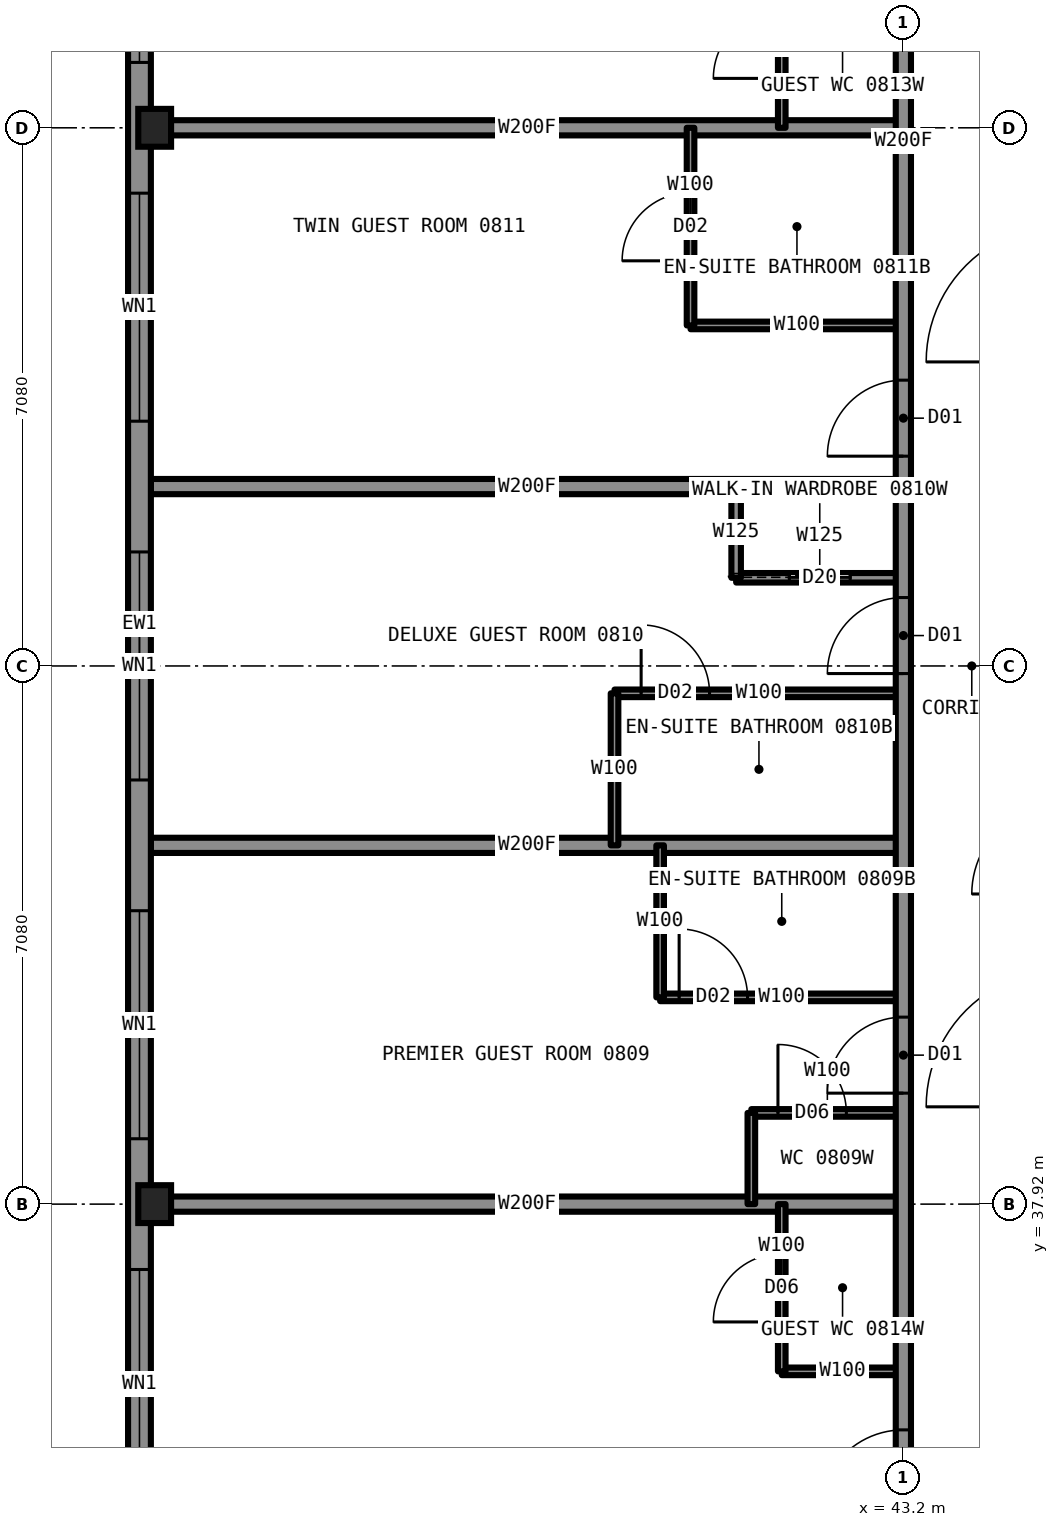
"""IFC4 building model, lengths in metres.
Left out: names, types, materials, properties, quantities, classifications, styles, units other than length and angle.
Written with IfcOpenShell. Run it as: python <this file> out.ifc"""

import sys

from ifc_helpers import new_model, si_unit, direction, frame, frame_2d, origin, origin_2d, place, context, subcontext, project, spatial, rectangle, i_section, extrude, element, fill, save


model = new_model("IFC4")
c1 = context("Model", 3, precision=1e-05, world=origin(), true_north=direction((0.0, 1.0)))
c2 = subcontext(c1, "Body", "Model", "MODEL_VIEW")
j1 = project(units=[si_unit("LENGTHUNIT", "METRE"), si_unit("PLANEANGLEUNIT", "RADIAN")], contexts=[c1])
p1 = place(None, origin())
s1 = spatial("IfcSite", under=j1, at=p1, CompositionType="ELEMENT")
p2 = place(p1, origin())
s2 = spatial("IfcBuilding", under=s1, at=p2, CompositionType="ELEMENT")
p3 = place(p2, frame((0.0, 0.0, 28.5)))
s3 = spatial("IfcBuildingStorey", under=s2, at=p3, CompositionType="ELEMENT", Elevation=28.5)
for number, where, z_axis, x_axis in (
    (1, (33.35, 37.92, 0.0), (0.0, 0.0, 1.0), (1.0, 0.0, 0.0)),
    (2, (33.35, 52.08, 0.0), (0.0, 0.0, 1.0), (1.0, 0.0, 0.0)),
):
    element("IfcColumn", number, at=place(p3, frame(where, z_axis=z_axis, x_axis=x_axis)), inside=s3, PredefinedType="COLUMN", context=c2, shape_type="SweptSolid", body=[
        extrude(i_section(OverallWidth=0.432, OverallDepth=0.498, WebThickness=0.056, FlangeThickness=0.089, at=origin_2d()), origin(), (0.0, 0.0, 1.0), 3.5),
    ])
p4 = place(p3, frame((39.4, 44.64, 0.0), z_axis=(0.0, 0.0, 1.0), x_axis=(1.0, 0.0, 0.0)))
e3 = element("IfcWall", 3, at=p4, inside=s3, PredefinedType="PARTITIONING", context=c2, shape_type="SweptSolid", body=[
    extrude(rectangle(XDim=3.8, YDim=0.1, at=frame_2d((1.9, 0.0))), origin(), (0.0, 0.0, 1.0), 3.33),
])
p5 = place(p4, frame((0.35, 0.0, 0.0)))
e4 = element("IfcOpeningElement", 4, at=p5, cuts=e3, PredefinedType="OPENING", context=c2, shape_type="SweptSolid", body=[
    extrude(rectangle(XDim=0.9, YDim=2.1, at=frame_2d((0.45, 1.05))), frame((0.0, 0.06, 0.0), z_axis=(0.0, -1.0, 0.0), x_axis=(1.0, 0.0, 0.0)), (0.0, 0.0, 1.0), 0.12),
])
p6 = place(p3, frame((33.3, 42.64, 0.0), z_axis=(0.0, 0.0, 1.0), x_axis=(1.0, 0.0, 0.0)))
e5 = element("IfcWall", 5, at=p6, inside=s3, PredefinedType="PARTITIONING", context=c2, shape_type="SweptSolid", body=[
    extrude(rectangle(XDim=9.9, YDim=0.2, at=frame_2d((4.95, 0.0))), origin(), (0.0, 0.0, 1.0), 2.723),
])
p7 = place(p3, frame((40.0, 40.64, 0.0), z_axis=(0.0, 0.0, 1.0), x_axis=(1.0, 0.0, 0.0)))
e6 = element("IfcWall", 6, at=p7, inside=s3, PredefinedType="PARTITIONING", context=c2, shape_type="SweptSolid", body=[
    extrude(rectangle(XDim=3.2, YDim=0.1, at=frame_2d((1.6, 0.0))), origin(), (0.0, 0.0, 1.0), 3.33),
])
p8 = place(p7, frame((0.25, 0.0, 0.0)))
e7 = element("IfcOpeningElement", 7, at=p8, cuts=e6, PredefinedType="OPENING", context=c2, shape_type="SweptSolid", body=[
    extrude(rectangle(XDim=0.9, YDim=2.1, at=frame_2d((0.45, 1.05))), frame((0.0, 0.06, 0.0), z_axis=(0.0, -1.0, 0.0), x_axis=(1.0, 0.0, 0.0)), (0.0, 0.0, 1.0), 0.12),
])
p9 = place(p3, frame((41.2, 39.12, 0.0), z_axis=(0.0, 0.0, 1.0), x_axis=(1.0, 0.0, 0.0)))
e8 = element("IfcWall", 8, at=p9, inside=s3, PredefinedType="PARTITIONING", context=c2, shape_type="SweptSolid", body=[
    extrude(rectangle(XDim=2.0, YDim=0.1, at=frame_2d((1.0, 0.0))), origin(), (0.0, 0.0, 1.0), 3.33),
])
p10 = place(p9, frame((0.35, 0.0, 0.0)))
e9 = element("IfcOpeningElement", 9, at=p10, cuts=e8, PredefinedType="OPENING", context=c2, shape_type="SweptSolid", body=[
    extrude(rectangle(XDim=0.9, YDim=2.1, at=frame_2d((0.45, 1.05))), frame((0.0, 0.06, 0.0), z_axis=(0.0, -1.0, 0.0), x_axis=(1.0, 0.0, 0.0)), (0.0, 0.0, 1.0), 0.12),
])
p11 = place(p3, frame((33.3, 37.92, 0.0), z_axis=(0.0, 0.0, 1.0), x_axis=(1.0, 0.0, 0.0)))
e10 = element("IfcWall", 10, at=p11, inside=s3, PredefinedType="PARTITIONING", context=c2, shape_type="SweptSolid", body=[
    extrude(rectangle(XDim=9.9, YDim=0.2, at=frame_2d((4.95, 0.0))), origin(), (0.0, 0.0, 1.0), 2.573),
])
p12 = place(p3, frame((41.6, 35.72, 0.0), z_axis=(0.0, 0.0, 1.0), x_axis=(1.0, 0.0, 0.0)))
e11 = element("IfcWall", 11, at=p12, inside=s3, PredefinedType="PARTITIONING", context=c2, shape_type="SweptSolid", body=[
    extrude(rectangle(XDim=1.6, YDim=0.1, at=frame_2d((0.8, 0.0))), origin(), (0.0, 0.0, 1.0), 2.723),
])
p13 = place(p3, frame((41.0, 46.16, 0.0), z_axis=(0.0, 0.0, 1.0), x_axis=(1.0, 0.0, 0.0)))
e12 = element("IfcWall", 12, at=p13, inside=s3, PredefinedType="PARTITIONING", context=c2, shape_type="SweptSolid", body=[
    extrude(rectangle(XDim=2.2, YDim=0.125, at=frame_2d((1.1, 0.0))), origin(), (0.0, 0.0, 1.0), 3.33),
])
p14 = place(p13, frame((0.7, 0.0, 0.0)))
e13 = element("IfcOpeningElement", 13, at=p14, cuts=e12, PredefinedType="OPENING", context=c2, shape_type="SweptSolid", body=[
    extrude(rectangle(XDim=0.8, YDim=2.1, at=frame_2d((0.4, 1.05))), frame((0.0, 0.073, 0.0), z_axis=(0.0, -1.0, 0.0), x_axis=(1.0, 0.0, 0.0)), (0.0, 0.0, 1.0), 0.145),
])
p15 = place(p3, frame((33.3, 47.36, 0.0), z_axis=(0.0, 0.0, 1.0), x_axis=(1.0, 0.0, 0.0)))
e14 = element("IfcWall", 14, at=p15, inside=s3, PredefinedType="PARTITIONING", context=c2, shape_type="SweptSolid", body=[
    extrude(rectangle(XDim=9.9, YDim=0.2, at=frame_2d((4.95, 0.0))), origin(), (0.0, 0.0, 1.0), 2.723),
])
p16 = place(p3, frame((40.4, 49.48, 0.0), z_axis=(0.0, 0.0, 1.0), x_axis=(1.0, 0.0, 0.0)))
e15 = element("IfcWall", 15, at=p16, inside=s3, PredefinedType="PARTITIONING", context=c2, shape_type="SweptSolid", body=[
    extrude(rectangle(XDim=2.8, YDim=0.1, at=frame_2d((1.4, 0.0))), origin(), (0.0, 0.0, 1.0), 3.33),
])
p17 = place(p3, frame((33.3, 52.08, 0.0), z_axis=(0.0, 0.0, 1.0), x_axis=(1.0, 0.0, 0.0)))
e16 = element("IfcWall", 16, at=p17, inside=s3, PredefinedType="PARTITIONING", context=c2, shape_type="SweptSolid", body=[
    extrude(rectangle(XDim=9.9, YDim=0.2, at=frame_2d((4.95, 0.0))), origin(), (0.0, 0.0, 1.0), 2.573),
])
p18 = place(p3, frame((43.2, 33.22, 0.0), z_axis=(0.0, 0.0, 1.0), x_axis=(0.0, 1.0, 0.0)))
e17 = element("IfcWall", 17, at=p18, inside=s3, PredefinedType="PARTITIONING", context=c2, shape_type="SweptSolid", body=[
    extrude(rectangle(XDim=23.56, YDim=0.2, at=frame_2d((11.78, 0.0))), origin(), (0.0, 0.0, 1.0), 3.33),
])
p19 = place(p18, frame((6.16, 0.0, 0.0)))
e18 = element("IfcOpeningElement", 18, at=p19, cuts=e17, PredefinedType="OPENING", context=c2, shape_type="SweptSolid", body=[
    extrude(rectangle(XDim=1.0, YDim=2.2, at=frame_2d((0.5, 1.1))), frame((0.0, 0.11, 0.0), z_axis=(0.0, -1.0, 0.0), x_axis=(1.0, 0.0, 0.0)), (0.0, 0.0, 1.0), 0.22),
])
p20 = place(p18, frame((11.68, 0.0, 0.0)))
e19 = element("IfcOpeningElement", 19, at=p20, cuts=e17, PredefinedType="OPENING", context=c2, shape_type="SweptSolid", body=[
    extrude(rectangle(XDim=1.0, YDim=2.2, at=frame_2d((0.5, 1.1))), frame((0.0, 0.11, 0.0), z_axis=(0.0, -1.0, 0.0), x_axis=(1.0, 0.0, 0.0)), (0.0, 0.0, 1.0), 0.22),
])
p21 = place(p18, frame((14.54, 0.0, 0.0)))
e20 = element("IfcOpeningElement", 20, at=p21, cuts=e17, PredefinedType="OPENING", context=c2, shape_type="SweptSolid", body=[
    extrude(rectangle(XDim=1.0, YDim=2.2, at=frame_2d((0.5, 1.1))), frame((0.0, 0.11, 0.0), z_axis=(0.0, -1.0, 0.0), x_axis=(1.0, 0.0, 0.0)), (0.0, 0.0, 1.0), 0.22),
])
p22 = place(p18, frame((21.83, 0.0, 0.0)))
e21 = element("IfcOpeningElement", 21, at=p22, cuts=e17, PredefinedType="OPENING", context=c2, shape_type="SweptSolid", body=[
    extrude(rectangle(XDim=1.1, YDim=2.2, at=frame_2d((0.55, 1.1))), frame((0.0, 0.11, 0.0), z_axis=(0.0, -1.0, 0.0), x_axis=(1.0, 0.0, 0.0)), (0.0, 0.0, 1.0), 0.22),
])
p23 = place(p18, frame((0.63, 0.0, 0.0)))
e22 = element("IfcOpeningElement", 22, at=p23, cuts=e17, PredefinedType="OPENING", context=c2, shape_type="SweptSolid", body=[
    extrude(rectangle(XDim=1.1, YDim=2.2, at=frame_2d((0.55, 1.1))), frame((0.0, 0.11, 0.0), z_axis=(0.0, -1.0, 0.0), x_axis=(1.0, 0.0, 0.0)), (0.0, 0.0, 1.0), 0.22),
])
p24 = place(p3, frame((41.6, 35.72, 0.0), z_axis=(0.0, 0.0, 1.0), x_axis=(0.0, 1.0, 0.0)))
e23 = element("IfcWall", 23, at=p24, inside=s3, PredefinedType="PARTITIONING", context=c2, shape_type="SweptSolid", body=[
    extrude(rectangle(XDim=2.2, YDim=0.1, at=frame_2d((1.1, 0.0))), origin(), (0.0, 0.0, 1.0), 3.33),
])
p25 = place(p24, frame((0.65, 0.0, 0.0)))
e24 = element("IfcOpeningElement", 24, at=p25, cuts=e23, PredefinedType="OPENING", context=c2, shape_type="SweptSolid", body=[
    extrude(rectangle(XDim=0.9, YDim=2.1, at=frame_2d((0.45, 1.05))), frame((0.0, 0.06, 0.0), z_axis=(0.0, -1.0, 0.0), x_axis=(1.0, 0.0, 0.0)), (0.0, 0.0, 1.0), 0.12),
])
p26 = place(p3, frame((41.6, 52.08, 0.0), z_axis=(0.0, 0.0, 1.0), x_axis=(0.0, 1.0, 0.0)))
e25 = element("IfcWall", 25, at=p26, inside=s3, PredefinedType="PARTITIONING", context=c2, shape_type="SweptSolid", body=[
    extrude(rectangle(XDim=2.2, YDim=0.1, at=frame_2d((1.1, 0.0))), origin(), (0.0, 0.0, 1.0), 3.33),
])
p27 = place(p26, frame((0.65, 0.0, 0.0)))
e26 = element("IfcOpeningElement", 26, at=p27, cuts=e25, PredefinedType="OPENING", context=c2, shape_type="SweptSolid", body=[
    extrude(rectangle(XDim=0.9, YDim=2.1, at=frame_2d((0.45, 1.05))), frame((0.0, 0.06, 0.0), z_axis=(0.0, -1.0, 0.0), x_axis=(1.0, 0.0, 0.0)), (0.0, 0.0, 1.0), 0.12),
])
p28 = place(p3, frame((41.2, 37.92, 0.0), z_axis=(0.0, 0.0, 1.0), x_axis=(0.0, 1.0, 0.0)))
e27 = element("IfcWall", 27, at=p28, inside=s3, PredefinedType="PARTITIONING", context=c2, shape_type="SweptSolid", body=[
    extrude(rectangle(XDim=1.2, YDim=0.1, at=frame_2d((0.6, 0.0))), origin(), (0.0, 0.0, 1.0), 3.33),
])
p29 = place(p3, frame((41.0, 46.16, 0.0), z_axis=(0.0, 0.0, 1.0), x_axis=(0.0, 1.0, 0.0)))
e28 = element("IfcWall", 28, at=p29, inside=s3, PredefinedType="PARTITIONING", context=c2, shape_type="SweptSolid", body=[
    extrude(rectangle(XDim=1.2, YDim=0.125, at=frame_2d((0.6, 0.0))), origin(), (0.0, 0.0, 1.0), 3.33),
])
p30 = place(p3, frame((40.4, 49.48, 0.0), z_axis=(0.0, 0.0, 1.0), x_axis=(0.0, 1.0, 0.0)))
e29 = element("IfcWall", 29, at=p30, inside=s3, PredefinedType="PARTITIONING", context=c2, shape_type="SweptSolid", body=[
    extrude(rectangle(XDim=2.6, YDim=0.1, at=frame_2d((1.3, 0.0))), origin(), (0.0, 0.0, 1.0), 3.33),
])
p31 = place(p30, frame((0.85, 0.0, 0.0)))
e30 = element("IfcOpeningElement", 30, at=p31, cuts=e29, PredefinedType="OPENING", context=c2, shape_type="SweptSolid", body=[
    extrude(rectangle(XDim=0.9, YDim=2.1, at=frame_2d((0.45, 1.05))), frame((0.0, 0.06, 0.0), z_axis=(0.0, -1.0, 0.0), x_axis=(1.0, 0.0, 0.0)), (0.0, 0.0, 1.0), 0.12),
])
for number, where, z_axis, x_axis in (
    (31, (40.0, 40.64, 0.0), (0.0, 0.0, 1.0), (0.0, 1.0, 0.0)),
    (32, (39.4, 42.64, 0.0), (0.0, 0.0, 1.0), (0.0, 1.0, 0.0)),
):
    element("IfcWall", number, at=place(p3, frame(where, z_axis=z_axis, x_axis=x_axis)), inside=s3, PredefinedType="PARTITIONING", context=c2, shape_type="SweptSolid", body=[
        extrude(rectangle(XDim=2.0, YDim=0.1, at=frame_2d((1.0, 0.0))), origin(), (0.0, 0.0, 1.0), 3.33),
    ])
p32 = place(p3, frame((33.15, 61.5, 0.0), z_axis=(0.0, 0.0, 1.0), x_axis=(0.0, -1.0, 0.0)))
e33 = element("IfcWall", 33, at=p32, inside=s3, PredefinedType="SOLIDWALL", context=c2, shape_type="SweptSolid", body=[
    extrude(rectangle(XDim=33.0, YDim=0.3, at=frame_2d((16.5, 0.0))), origin(), (0.0, 0.0, 1.0), 2.83),
])
p33 = place(p32, frame((0.85, 0.0, 0.5)))
e34 = element("IfcOpeningElement", 34, at=p33, cuts=e33, PredefinedType="OPENING", context=c2, shape_type="SweptSolid", body=[
    extrude(rectangle(XDim=3.0, YDim=2.0, at=frame_2d((1.5, 1.0))), frame((0.0, 0.16, 0.0), z_axis=(0.0, -1.0, 0.0), x_axis=(1.0, 0.0, 0.0)), (0.0, 0.0, 1.0), 0.32),
])
p34 = place(p32, frame((5.56, 0.0, 0.5)))
e35 = element("IfcOpeningElement", 35, at=p34, cuts=e33, PredefinedType="OPENING", context=c2, shape_type="SweptSolid", body=[
    extrude(rectangle(XDim=3.0, YDim=2.0, at=frame_2d((1.5, 1.0))), frame((0.0, 0.16, 0.0), z_axis=(0.0, -1.0, 0.0), x_axis=(1.0, 0.0, 0.0)), (0.0, 0.0, 1.0), 0.32),
])
p35 = place(p32, frame((10.28, 0.0, 0.5)))
e36 = element("IfcOpeningElement", 36, at=p35, cuts=e33, PredefinedType="OPENING", context=c2, shape_type="SweptSolid", body=[
    extrude(rectangle(XDim=3.0, YDim=2.0, at=frame_2d((1.5, 1.0))), frame((0.0, 0.16, 0.0), z_axis=(0.0, -1.0, 0.0), x_axis=(1.0, 0.0, 0.0)), (0.0, 0.0, 1.0), 0.32),
])
p36 = place(p32, frame((15.0, 0.0, 0.5)))
e37 = element("IfcOpeningElement", 37, at=p36, cuts=e33, PredefinedType="OPENING", context=c2, shape_type="SweptSolid", body=[
    extrude(rectangle(XDim=3.0, YDim=2.0, at=frame_2d((1.5, 1.0))), frame((0.0, 0.16, 0.0), z_axis=(0.0, -1.0, 0.0), x_axis=(1.0, 0.0, 0.0)), (0.0, 0.0, 1.0), 0.32),
])
p37 = place(p32, frame((19.72, 0.0, 0.5)))
e38 = element("IfcOpeningElement", 38, at=p37, cuts=e33, PredefinedType="OPENING", context=c2, shape_type="SweptSolid", body=[
    extrude(rectangle(XDim=3.0, YDim=2.0, at=frame_2d((1.5, 1.0))), frame((0.0, 0.16, 0.0), z_axis=(0.0, -1.0, 0.0), x_axis=(1.0, 0.0, 0.0)), (0.0, 0.0, 1.0), 0.32),
])
p38 = place(p32, frame((24.44, 0.0, 0.5)))
e39 = element("IfcOpeningElement", 39, at=p38, cuts=e33, PredefinedType="OPENING", context=c2, shape_type="SweptSolid", body=[
    extrude(rectangle(XDim=3.0, YDim=2.0, at=frame_2d((1.5, 1.0))), frame((0.0, 0.16, 0.0), z_axis=(0.0, -1.0, 0.0), x_axis=(1.0, 0.0, 0.0)), (0.0, 0.0, 1.0), 0.32),
])
p39 = place(p32, frame((29.15, 0.0, 0.5)))
e40 = element("IfcOpeningElement", 40, at=p39, cuts=e33, PredefinedType="OPENING", context=c2, shape_type="SweptSolid", body=[
    extrude(rectangle(XDim=3.0, YDim=2.0, at=frame_2d((1.5, 1.0))), frame((0.0, 0.16, 0.0), z_axis=(0.0, -1.0, 0.0), x_axis=(1.0, 0.0, 0.0)), (0.0, 0.0, 1.0), 0.32),
])
p40 = place(p19, origin())
e41 = element("IfcDoor", 41, at=p40, inside=s3, OperationType="SINGLE_SWING_LEFT", PredefinedType="DOOR", context=c2, shape_type="SweptSolid", body=[
    extrude(rectangle(XDim=1.0, YDim=2.2, at=frame_2d((0.5, 1.1))), frame((0.0, 0.025, 0.0), z_axis=(0.0, -1.0, 0.0), x_axis=(1.0, 0.0, 0.0)), (0.0, 0.0, 1.0), 0.05),
])
fill(e18, e41)
p41 = place(p8, origin())
e42 = element("IfcDoor", 42, at=p41, inside=s3, OperationType="SINGLE_SWING_RIGHT", PredefinedType="DOOR", context=c2, shape_type="SweptSolid", body=[
    extrude(rectangle(XDim=0.9, YDim=2.1, at=frame_2d((0.45, 1.05))), frame((0.0, 0.025, 0.0), z_axis=(0.0, -1.0, 0.0), x_axis=(1.0, 0.0, 0.0)), (0.0, 0.0, 1.0), 0.05),
])
fill(e7, e42)
p42 = place(p10, origin())
e43 = element("IfcDoor", 43, at=p42, inside=s3, OperationType="SINGLE_SWING_LEFT", PredefinedType="DOOR", context=c2, shape_type="SweptSolid", body=[
    extrude(rectangle(XDim=0.9, YDim=2.1, at=frame_2d((0.45, 1.05))), frame((0.0, 0.025, 0.0), z_axis=(0.0, -1.0, 0.0), x_axis=(1.0, 0.0, 0.0)), (0.0, 0.0, 1.0), 0.05),
])
fill(e9, e43)
p43 = place(p20, origin())
e44 = element("IfcDoor", 44, at=p43, inside=s3, OperationType="SINGLE_SWING_LEFT", PredefinedType="DOOR", context=c2, shape_type="SweptSolid", body=[
    extrude(rectangle(XDim=1.0, YDim=2.2, at=frame_2d((0.5, 1.1))), frame((0.0, 0.025, 0.0), z_axis=(0.0, -1.0, 0.0), x_axis=(1.0, 0.0, 0.0)), (0.0, 0.0, 1.0), 0.05),
])
fill(e19, e44)
p44 = place(p5, origin())
e45 = element("IfcDoor", 45, at=p44, inside=s3, OperationType="SINGLE_SWING_RIGHT", PredefinedType="DOOR", context=c2, shape_type="SweptSolid", body=[
    extrude(rectangle(XDim=0.9, YDim=2.1, at=frame_2d((0.45, 1.05))), frame((0.0, 0.025, 0.0), z_axis=(0.0, -1.0, 0.0), x_axis=(1.0, 0.0, 0.0)), (0.0, 0.0, 1.0), 0.05),
])
fill(e4, e45)
p45 = place(p14, origin())
e46 = element("IfcDoor", 46, at=p45, inside=s3, OperationType="SLIDING_TO_LEFT", PredefinedType="DOOR", context=c2, shape_type="SweptSolid", body=[
    extrude(rectangle(XDim=0.8, YDim=2.1, at=frame_2d((0.4, 1.05))), frame((0.0, 0.025, 0.0), z_axis=(0.0, -1.0, 0.0), x_axis=(1.0, 0.0, 0.0)), (0.0, 0.0, 1.0), 0.05),
])
fill(e13, e46)
p46 = place(p21, origin())
e47 = element("IfcDoor", 47, at=p46, inside=s3, OperationType="SINGLE_SWING_LEFT", PredefinedType="DOOR", context=c2, shape_type="SweptSolid", body=[
    extrude(rectangle(XDim=1.0, YDim=2.2, at=frame_2d((0.5, 1.1))), frame((0.0, 0.025, 0.0), z_axis=(0.0, -1.0, 0.0), x_axis=(1.0, 0.0, 0.0)), (0.0, 0.0, 1.0), 0.05),
])
fill(e20, e47)
p47 = place(p31, origin())
e48 = element("IfcDoor", 48, at=p47, inside=s3, OperationType="SINGLE_SWING_RIGHT", PredefinedType="DOOR", context=c2, shape_type="SweptSolid", body=[
    extrude(rectangle(XDim=0.9, YDim=2.1, at=frame_2d((0.45, 1.05))), frame((0.0, 0.025, 0.0), z_axis=(0.0, -1.0, 0.0), x_axis=(1.0, 0.0, 0.0)), (0.0, 0.0, 1.0), 0.05),
])
fill(e30, e48)
p48 = place(p27, origin())
e49 = element("IfcDoor", 49, at=p48, inside=s3, OperationType="SINGLE_SWING_LEFT", PredefinedType="DOOR", context=c2, shape_type="SweptSolid", body=[
    extrude(rectangle(XDim=0.9, YDim=2.1, at=frame_2d((0.45, 1.05))), frame((0.0, 0.025, 0.0), z_axis=(0.0, -1.0, 0.0), x_axis=(1.0, 0.0, 0.0)), (0.0, 0.0, 1.0), 0.05),
])
fill(e26, e49)
p49 = place(p23, origin())
e50 = element("IfcDoor", 50, at=p49, inside=s3, OperationType="SINGLE_SWING_LEFT", PredefinedType="DOOR", context=c2, shape_type="SweptSolid", body=[
    extrude(rectangle(XDim=1.1, YDim=2.2, at=frame_2d((0.55, 1.1))), frame((0.0, 0.025, 0.0), z_axis=(0.0, -1.0, 0.0), x_axis=(1.0, 0.0, 0.0)), (0.0, 0.0, 1.0), 0.05),
])
fill(e22, e50)
p50 = place(p25, origin())
e51 = element("IfcDoor", 51, at=p50, inside=s3, OperationType="SINGLE_SWING_LEFT", PredefinedType="DOOR", context=c2, shape_type="SweptSolid", body=[
    extrude(rectangle(XDim=0.9, YDim=2.1, at=frame_2d((0.45, 1.05))), frame((0.0, 0.025, 0.0), z_axis=(0.0, -1.0, 0.0), x_axis=(1.0, 0.0, 0.0)), (0.0, 0.0, 1.0), 0.05),
])
fill(e24, e51)
p51 = place(p34, origin())
e52 = element("IfcWindow", 52, at=p51, inside=s3, PartitioningType="SINGLE_PANEL", PredefinedType="WINDOW", context=c2, shape_type="SweptSolid", body=[
    extrude(rectangle(XDim=3.0, YDim=2.0, at=frame_2d((1.5, 1.0))), frame((0.0, 0.03, 0.0), z_axis=(0.0, -1.0, 0.0), x_axis=(1.0, 0.0, 0.0)), (0.0, 0.0, 1.0), 0.06),
])
fill(e35, e52)
p52 = place(p35, origin())
e53 = element("IfcWindow", 53, at=p52, inside=s3, PartitioningType="SINGLE_PANEL", PredefinedType="WINDOW", context=c2, shape_type="SweptSolid", body=[
    extrude(rectangle(XDim=3.0, YDim=2.0, at=frame_2d((1.5, 1.0))), frame((0.0, 0.03, 0.0), z_axis=(0.0, -1.0, 0.0), x_axis=(1.0, 0.0, 0.0)), (0.0, 0.0, 1.0), 0.06),
])
fill(e36, e53)
p53 = place(p36, origin())
e54 = element("IfcWindow", 54, at=p53, inside=s3, PartitioningType="SINGLE_PANEL", PredefinedType="WINDOW", context=c2, shape_type="SweptSolid", body=[
    extrude(rectangle(XDim=3.0, YDim=2.0, at=frame_2d((1.5, 1.0))), frame((0.0, 0.03, 0.0), z_axis=(0.0, -1.0, 0.0), x_axis=(1.0, 0.0, 0.0)), (0.0, 0.0, 1.0), 0.06),
])
fill(e37, e54)
p54 = place(p37, origin())
e55 = element("IfcWindow", 55, at=p54, inside=s3, PartitioningType="SINGLE_PANEL", PredefinedType="WINDOW", context=c2, shape_type="SweptSolid", body=[
    extrude(rectangle(XDim=3.0, YDim=2.0, at=frame_2d((1.5, 1.0))), frame((0.0, 0.03, 0.0), z_axis=(0.0, -1.0, 0.0), x_axis=(1.0, 0.0, 0.0)), (0.0, 0.0, 1.0), 0.06),
])
fill(e38, e55)
p55 = place(p38, origin())
e56 = element("IfcWindow", 56, at=p55, inside=s3, PartitioningType="SINGLE_PANEL", PredefinedType="WINDOW", context=c2, shape_type="SweptSolid", body=[
    extrude(rectangle(XDim=3.0, YDim=2.0, at=frame_2d((1.5, 1.0))), frame((0.0, 0.03, 0.0), z_axis=(0.0, -1.0, 0.0), x_axis=(1.0, 0.0, 0.0)), (0.0, 0.0, 1.0), 0.06),
])
fill(e39, e56)
save(model, sys.argv[1])
